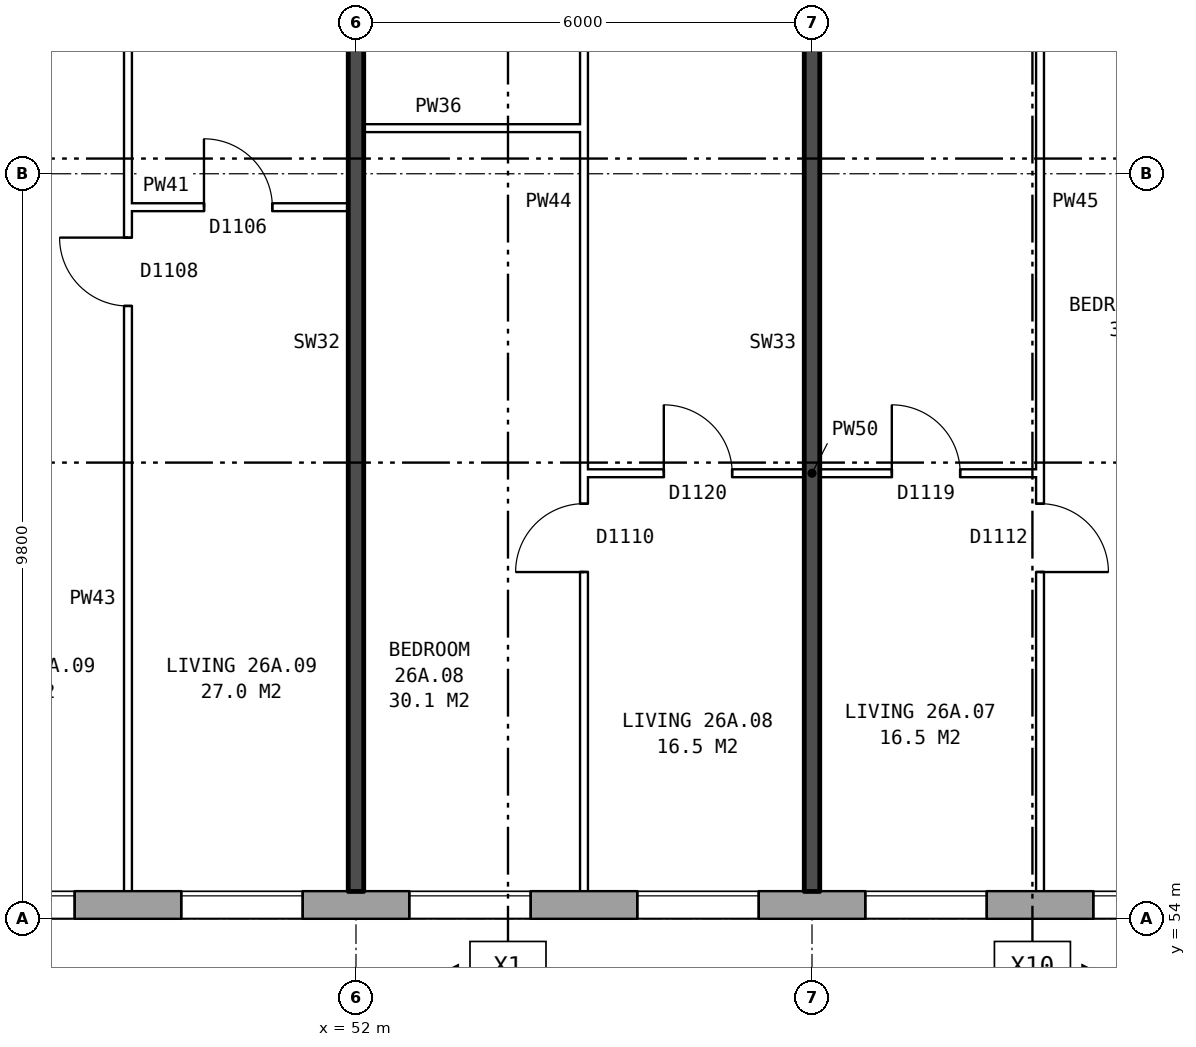
"""IFC4 building model, lengths in metres.
Left out: names, types, materials, properties, quantities, classifications, styles, units other than length and angle.
Written with IfcOpenShell. Run it as: python <this file> out.ifc"""

import sys

from ifc_helpers import new_model, si_unit, direction, frame, frame_2d, origin, place, context, subcontext, project, spatial, rectangle, extrude, element, fill, save


model = new_model("IFC4")
c1 = context("Model", 3, precision=1e-05, world=origin(), true_north=direction((0.0, 1.0)))
c2 = subcontext(c1, "Body", "Model", "MODEL_VIEW")
j1 = project(units=[si_unit("LENGTHUNIT", "METRE"), si_unit("PLANEANGLEUNIT", "RADIAN")], contexts=[c1])
p1 = place(None, origin())
s1 = spatial("IfcSite", under=j1, at=p1, CompositionType="ELEMENT")
p2 = place(p1, origin())
s2 = spatial("IfcBuilding", under=s1, at=p2, CompositionType="ELEMENT")
p3 = place(p2, frame((0.0, 0.0, 96.4)))
s3 = spatial("IfcBuildingStorey", under=s2, at=p3, CompositionType="ELEMENT", Elevation=96.4)
p4 = place(p3, frame((28.075, 54.18, 0.0), z_axis=(0.0, 0.0, 1.0), x_axis=(1.0, 0.0, 0.0)))
e1 = element("IfcWall", 1, at=p4, inside=s3, PredefinedType="STANDARD", context=c2, shape_type="SweptSolid", body=[
    extrude(rectangle(XDim=44.851, YDim=0.36, at=frame_2d((22.425, 0.0))), origin(), (0.0, 0.0, 1.0), 2.85),
])
p5 = place(p4, frame((0.4, 0.0, 0.8)))
e2 = element("IfcOpeningElement", 2, at=p5, cuts=e1, PredefinedType="OPENING", context=c2, shape_type="SweptSolid", body=[
    extrude(rectangle(XDim=0.8, YDim=0.9, at=frame_2d((0.4, 0.45))), frame((0.0, 0.19, 0.0), z_axis=(0.0, -1.0, 0.0), x_axis=(1.0, 0.0, 0.0)), (0.0, 0.0, 1.0), 0.38),
])
p6 = place(p4, frame((3.625, 0.0, 0.8)))
e3 = element("IfcOpeningElement", 3, at=p6, cuts=e1, PredefinedType="OPENING", context=c2, shape_type="SweptSolid", body=[
    extrude(rectangle(XDim=1.6, YDim=1.8, at=frame_2d((0.8, 0.9))), frame((0.0, 0.19, 0.0), z_axis=(0.0, -1.0, 0.0), x_axis=(1.0, 0.0, 0.0)), (0.0, 0.0, 1.0), 0.38),
])
p7 = place(p4, frame((6.625, 0.0, 0.8)))
e4 = element("IfcOpeningElement", 4, at=p7, cuts=e1, PredefinedType="OPENING", context=c2, shape_type="SweptSolid", body=[
    extrude(rectangle(XDim=1.6, YDim=1.8, at=frame_2d((0.8, 0.9))), frame((0.0, 0.19, 0.0), z_axis=(0.0, -1.0, 0.0), x_axis=(1.0, 0.0, 0.0)), (0.0, 0.0, 1.0), 0.38),
])
p8 = place(p4, frame((9.625, 0.0, 0.8)))
e5 = element("IfcOpeningElement", 5, at=p8, cuts=e1, PredefinedType="OPENING", context=c2, shape_type="SweptSolid", body=[
    extrude(rectangle(XDim=1.6, YDim=1.8, at=frame_2d((0.8, 0.9))), frame((0.0, 0.19, 0.0), z_axis=(0.0, -1.0, 0.0), x_axis=(1.0, 0.0, 0.0)), (0.0, 0.0, 1.0), 0.38),
])
p9 = place(p4, frame((12.625, 0.0, 0.8)))
e6 = element("IfcOpeningElement", 6, at=p9, cuts=e1, PredefinedType="OPENING", context=c2, shape_type="SweptSolid", body=[
    extrude(rectangle(XDim=1.6, YDim=1.8, at=frame_2d((0.8, 0.9))), frame((0.0, 0.19, 0.0), z_axis=(0.0, -1.0, 0.0), x_axis=(1.0, 0.0, 0.0)), (0.0, 0.0, 1.0), 0.38),
])
p10 = place(p4, frame((15.625, 0.0, 0.8)))
e7 = element("IfcOpeningElement", 7, at=p10, cuts=e1, PredefinedType="OPENING", context=c2, shape_type="SweptSolid", body=[
    extrude(rectangle(XDim=1.6, YDim=1.8, at=frame_2d((0.8, 0.9))), frame((0.0, 0.19, 0.0), z_axis=(0.0, -1.0, 0.0), x_axis=(1.0, 0.0, 0.0)), (0.0, 0.0, 1.0), 0.38),
])
p11 = place(p4, frame((18.625, 0.0, 0.8)))
e8 = element("IfcOpeningElement", 8, at=p11, cuts=e1, PredefinedType="OPENING", context=c2, shape_type="SweptSolid", body=[
    extrude(rectangle(XDim=1.6, YDim=1.8, at=frame_2d((0.8, 0.9))), frame((0.0, 0.19, 0.0), z_axis=(0.0, -1.0, 0.0), x_axis=(1.0, 0.0, 0.0)), (0.0, 0.0, 1.0), 0.38),
])
p12 = place(p4, frame((21.625, 0.0, 0.8)))
e9 = element("IfcOpeningElement", 9, at=p12, cuts=e1, PredefinedType="OPENING", context=c2, shape_type="SweptSolid", body=[
    extrude(rectangle(XDim=1.6, YDim=1.8, at=frame_2d((0.8, 0.9))), frame((0.0, 0.19, 0.0), z_axis=(0.0, -1.0, 0.0), x_axis=(1.0, 0.0, 0.0)), (0.0, 0.0, 1.0), 0.38),
])
p13 = place(p4, frame((24.625, 0.0, 0.8)))
e10 = element("IfcOpeningElement", 10, at=p13, cuts=e1, PredefinedType="OPENING", context=c2, shape_type="SweptSolid", body=[
    extrude(rectangle(XDim=1.6, YDim=1.8, at=frame_2d((0.8, 0.9))), frame((0.0, 0.19, 0.0), z_axis=(0.0, -1.0, 0.0), x_axis=(1.0, 0.0, 0.0)), (0.0, 0.0, 1.0), 0.38),
])
p14 = place(p4, frame((27.625, 0.0, 0.8)))
e11 = element("IfcOpeningElement", 11, at=p14, cuts=e1, PredefinedType="OPENING", context=c2, shape_type="SweptSolid", body=[
    extrude(rectangle(XDim=1.6, YDim=1.8, at=frame_2d((0.8, 0.9))), frame((0.0, 0.19, 0.0), z_axis=(0.0, -1.0, 0.0), x_axis=(1.0, 0.0, 0.0)), (0.0, 0.0, 1.0), 0.38),
])
p15 = place(p4, frame((30.625, 0.0, 0.8)))
e12 = element("IfcOpeningElement", 12, at=p15, cuts=e1, PredefinedType="OPENING", context=c2, shape_type="SweptSolid", body=[
    extrude(rectangle(XDim=1.6, YDim=1.8, at=frame_2d((0.8, 0.9))), frame((0.0, 0.19, 0.0), z_axis=(0.0, -1.0, 0.0), x_axis=(1.0, 0.0, 0.0)), (0.0, 0.0, 1.0), 0.38),
])
p16 = place(p4, frame((33.625, 0.0, 0.8)))
e13 = element("IfcOpeningElement", 13, at=p16, cuts=e1, PredefinedType="OPENING", context=c2, shape_type="SweptSolid", body=[
    extrude(rectangle(XDim=1.6, YDim=1.8, at=frame_2d((0.8, 0.9))), frame((0.0, 0.19, 0.0), z_axis=(0.0, -1.0, 0.0), x_axis=(1.0, 0.0, 0.0)), (0.0, 0.0, 1.0), 0.38),
])
p17 = place(p4, frame((36.625, 0.0, 0.8)))
e14 = element("IfcOpeningElement", 14, at=p17, cuts=e1, PredefinedType="OPENING", context=c2, shape_type="SweptSolid", body=[
    extrude(rectangle(XDim=1.6, YDim=1.8, at=frame_2d((0.8, 0.9))), frame((0.0, 0.19, 0.0), z_axis=(0.0, -1.0, 0.0), x_axis=(1.0, 0.0, 0.0)), (0.0, 0.0, 1.0), 0.38),
])
p18 = place(p4, frame((39.625, 0.0, 0.8)))
e15 = element("IfcOpeningElement", 15, at=p18, cuts=e1, PredefinedType="OPENING", context=c2, shape_type="SweptSolid", body=[
    extrude(rectangle(XDim=1.6, YDim=1.8, at=frame_2d((0.8, 0.9))), frame((0.0, 0.19, 0.0), z_axis=(0.0, -1.0, 0.0), x_axis=(1.0, 0.0, 0.0)), (0.0, 0.0, 1.0), 0.38),
])
p19 = place(p4, frame((42.125, 0.0, 0.8)))
e16 = element("IfcOpeningElement", 16, at=p19, cuts=e1, PredefinedType="OPENING", context=c2, shape_type="SweptSolid", body=[
    extrude(rectangle(XDim=1.0, YDim=1.8, at=frame_2d((0.5, 0.9))), frame((0.0, 0.19, 0.0), z_axis=(0.0, -1.0, 0.0), x_axis=(1.0, 0.0, 0.0)), (0.0, 0.0, 1.0), 0.38),
])
p20 = place(p4, frame((1.65, 0.0, 0.8)))
e17 = element("IfcOpeningElement", 17, at=p20, cuts=e1, PredefinedType="OPENING", context=c2, shape_type="SweptSolid", body=[
    extrude(rectangle(XDim=1.6, YDim=1.8, at=frame_2d((0.8, 0.9))), frame((0.0, 0.19, 0.0), z_axis=(0.0, -1.0, 0.0), x_axis=(1.0, 0.0, 0.0)), (0.0, 0.0, 1.0), 0.38),
])
p21 = place(p4, frame((43.425, 0.0, 0.8)))
e18 = element("IfcOpeningElement", 18, at=p21, cuts=e1, PredefinedType="OPENING", context=c2, shape_type="SweptSolid", body=[
    extrude(rectangle(XDim=1.0, YDim=0.9, at=frame_2d((0.5, 0.45))), frame((0.0, 0.19, 0.0), z_axis=(0.0, -1.0, 0.0), x_axis=(1.0, 0.0, 0.0)), (0.0, 0.0, 1.0), 0.38),
])
p22 = place(p3, frame((55.0, 59.86, 0.0), z_axis=(0.0, 0.0, 1.0), x_axis=(1.0, 0.0, 0.0)))
e19 = element("IfcWall", 19, at=p22, inside=s3, PredefinedType="PARTITIONING", context=c2, shape_type="SweptSolid", body=[
    extrude(rectangle(XDim=6.0, YDim=0.1, at=frame_2d((3.0, 0.0))), origin(), (0.0, 0.0, 1.0), 2.85),
])
p23 = place(p22, frame((4.05, 0.0, 0.0)))
e20 = element("IfcOpeningElement", 20, at=p23, cuts=e19, PredefinedType="OPENING", context=c2, shape_type="SweptSolid", body=[
    extrude(rectangle(XDim=0.9, YDim=2.1, at=frame_2d((0.45, 1.05))), frame((0.0, 0.06, 0.0), z_axis=(0.0, -1.0, 0.0), x_axis=(1.0, 0.0, 0.0)), (0.0, 0.0, 1.0), 0.12),
])
p24 = place(p22, frame((1.05, 0.0, 0.0)))
e21 = element("IfcOpeningElement", 21, at=p24, cuts=e19, PredefinedType="OPENING", context=c2, shape_type="SweptSolid", body=[
    extrude(rectangle(XDim=0.9, YDim=2.1, at=frame_2d((0.45, 1.05))), frame((0.0, 0.06, 0.0), z_axis=(0.0, -1.0, 0.0), x_axis=(1.0, 0.0, 0.0)), (0.0, 0.0, 1.0), 0.12),
])
p25 = place(p3, frame((49.0, 63.36, 0.0), z_axis=(0.0, 0.0, 1.0), x_axis=(1.0, 0.0, 0.0)))
e22 = element("IfcWall", 22, at=p25, inside=s3, PredefinedType="PARTITIONING", context=c2, shape_type="SweptSolid", body=[
    extrude(rectangle(XDim=2.9, YDim=0.1, at=frame_2d((1.45, 0.0))), origin(), (0.0, 0.0, 1.0), 2.85),
])
p26 = place(p25, frame((1.0, 0.0, 0.0)))
e23 = element("IfcOpeningElement", 23, at=p26, cuts=e22, PredefinedType="OPENING", context=c2, shape_type="SweptSolid", body=[
    extrude(rectangle(XDim=0.9, YDim=2.1, at=frame_2d((0.45, 1.05))), frame((0.0, 0.06, 0.0), z_axis=(0.0, -1.0, 0.0), x_axis=(1.0, 0.0, 0.0)), (0.0, 0.0, 1.0), 0.12),
])
p27 = place(p3, frame((52.1, 64.4, 0.0), z_axis=(0.0, 0.0, 1.0), x_axis=(1.0, 0.0, 0.0)))
e24 = element("IfcWall", 24, at=p27, inside=s3, PredefinedType="PARTITIONING", context=c2, shape_type="SweptSolid", body=[
    extrude(rectangle(XDim=2.9, YDim=0.1, at=frame_2d((1.45, 0.0))), origin(), (0.0, 0.0, 1.0), 2.85),
])
p28 = place(p3, frame((49.0, 54.36, 0.0), z_axis=(0.0, 0.0, 1.0), x_axis=(0.0, 1.0, 0.0)))
e25 = element("IfcWall", 25, at=p28, inside=s3, PredefinedType="PARTITIONING", context=c2, shape_type="SweptSolid", body=[
    extrude(rectangle(XDim=14.34, YDim=0.1, at=frame_2d((7.17, 0.0))), origin(), (0.0, 0.0, 1.0), 2.85),
])
p29 = place(p28, frame((7.7, 0.0, 0.0)))
e26 = element("IfcOpeningElement", 26, at=p29, cuts=e25, PredefinedType="OPENING", context=c2, shape_type="SweptSolid", body=[
    extrude(rectangle(XDim=0.9, YDim=2.1, at=frame_2d((0.45, 1.05))), frame((0.0, 0.06, 0.0), z_axis=(0.0, -1.0, 0.0), x_axis=(1.0, 0.0, 0.0)), (0.0, 0.0, 1.0), 0.12),
])
p30 = place(p28, frame((13.04, 0.0, 0.0)))
e27 = element("IfcOpeningElement", 27, at=p30, cuts=e25, PredefinedType="OPENING", context=c2, shape_type="SweptSolid", body=[
    extrude(rectangle(XDim=0.9, YDim=2.1, at=frame_2d((0.45, 1.05))), frame((0.0, 0.06, 0.0), z_axis=(0.0, -1.0, 0.0), x_axis=(1.0, 0.0, 0.0)), (0.0, 0.0, 1.0), 0.12),
])
p31 = place(p3, frame((52.0, 54.36, 0.0), z_axis=(0.0, 0.0, 1.0), x_axis=(0.0, 1.0, 0.0)))
e28 = element("IfcWall", 28, at=p31, inside=s3, PredefinedType="SOLIDWALL", context=c2, shape_type="SweptSolid", body=[
    extrude(rectangle(XDim=14.44, YDim=0.2, at=frame_2d((7.22, 0.0))), origin(), (0.0, 0.0, 1.0), 2.85),
])
p32 = place(p3, frame((55.0, 54.36, 0.0), z_axis=(0.0, 0.0, 1.0), x_axis=(0.0, 1.0, 0.0)))
e29 = element("IfcWall", 29, at=p32, inside=s3, PredefinedType="PARTITIONING", context=c2, shape_type="SweptSolid", body=[
    extrude(rectangle(XDim=14.34, YDim=0.1, at=frame_2d((7.17, 0.0))), origin(), (0.0, 0.0, 1.0), 2.85),
])
p33 = place(p32, frame((4.2, 0.0, 0.0)))
e30 = element("IfcOpeningElement", 30, at=p33, cuts=e29, PredefinedType="OPENING", context=c2, shape_type="SweptSolid", body=[
    extrude(rectangle(XDim=0.9, YDim=2.1, at=frame_2d((0.45, 1.05))), frame((0.0, 0.06, 0.0), z_axis=(0.0, -1.0, 0.0), x_axis=(1.0, 0.0, 0.0)), (0.0, 0.0, 1.0), 0.12),
])
p34 = place(p32, frame((13.04, 0.0, 0.0)))
e31 = element("IfcOpeningElement", 31, at=p34, cuts=e29, PredefinedType="OPENING", context=c2, shape_type="SweptSolid", body=[
    extrude(rectangle(XDim=0.9, YDim=2.1, at=frame_2d((0.45, 1.05))), frame((0.0, 0.06, 0.0), z_axis=(0.0, -1.0, 0.0), x_axis=(1.0, 0.0, 0.0)), (0.0, 0.0, 1.0), 0.12),
])
p35 = place(p3, frame((58.0, 54.36, 0.0), z_axis=(0.0, 0.0, 1.0), x_axis=(0.0, 1.0, 0.0)))
e32 = element("IfcWall", 32, at=p35, inside=s3, PredefinedType="SOLIDWALL", context=c2, shape_type="SweptSolid", body=[
    extrude(rectangle(XDim=14.44, YDim=0.2, at=frame_2d((7.22, 0.0))), origin(), (0.0, 0.0, 1.0), 2.85),
])
p36 = place(p3, frame((61.0, 54.36, 0.0), z_axis=(0.0, 0.0, 1.0), x_axis=(0.0, 1.0, 0.0)))
e33 = element("IfcWall", 33, at=p36, inside=s3, PredefinedType="PARTITIONING", context=c2, shape_type="SweptSolid", body=[
    extrude(rectangle(XDim=14.34, YDim=0.1, at=frame_2d((7.17, 0.0))), origin(), (0.0, 0.0, 1.0), 2.85),
])
p37 = place(p36, frame((4.2, 0.0, 0.0)))
e34 = element("IfcOpeningElement", 34, at=p37, cuts=e33, PredefinedType="OPENING", context=c2, shape_type="SweptSolid", body=[
    extrude(rectangle(XDim=0.9, YDim=2.1, at=frame_2d((0.45, 1.05))), frame((0.0, 0.06, 0.0), z_axis=(0.0, -1.0, 0.0), x_axis=(1.0, 0.0, 0.0)), (0.0, 0.0, 1.0), 0.12),
])
p38 = place(p36, frame((13.04, 0.0, 0.0)))
e35 = element("IfcOpeningElement", 35, at=p38, cuts=e33, PredefinedType="OPENING", context=c2, shape_type="SweptSolid", body=[
    extrude(rectangle(XDim=0.9, YDim=2.1, at=frame_2d((0.45, 1.05))), frame((0.0, 0.06, 0.0), z_axis=(0.0, -1.0, 0.0), x_axis=(1.0, 0.0, 0.0)), (0.0, 0.0, 1.0), 0.12),
])
p39 = place(p11, origin())
e36 = element("IfcWindow", 36, at=p39, inside=s3, PartitioningType="SINGLE_PANEL", PredefinedType="WINDOW", context=c2, shape_type="SweptSolid", body=[
    extrude(rectangle(XDim=1.6, YDim=1.8, at=frame_2d((0.8, 0.9))), frame((0.0, 0.15, 0.0), z_axis=(0.0, -1.0, 0.0), x_axis=(1.0, 0.0, 0.0)), (0.0, 0.0, 1.0), 0.06),
])
fill(e8, e36)
p40 = place(p12, origin())
e37 = element("IfcWindow", 37, at=p40, inside=s3, PartitioningType="SINGLE_PANEL", PredefinedType="WINDOW", context=c2, shape_type="SweptSolid", body=[
    extrude(rectangle(XDim=1.6, YDim=1.8, at=frame_2d((0.8, 0.9))), frame((0.0, 0.15, 0.0), z_axis=(0.0, -1.0, 0.0), x_axis=(1.0, 0.0, 0.0)), (0.0, 0.0, 1.0), 0.06),
])
fill(e9, e37)
p41 = place(p13, origin())
e38 = element("IfcWindow", 38, at=p41, inside=s3, PartitioningType="SINGLE_PANEL", PredefinedType="WINDOW", context=c2, shape_type="SweptSolid", body=[
    extrude(rectangle(XDim=1.6, YDim=1.8, at=frame_2d((0.8, 0.9))), frame((0.0, 0.15, 0.0), z_axis=(0.0, -1.0, 0.0), x_axis=(1.0, 0.0, 0.0)), (0.0, 0.0, 1.0), 0.06),
])
fill(e10, e38)
p42 = place(p14, origin())
e39 = element("IfcWindow", 39, at=p42, inside=s3, PartitioningType="SINGLE_PANEL", PredefinedType="WINDOW", context=c2, shape_type="SweptSolid", body=[
    extrude(rectangle(XDim=1.6, YDim=1.8, at=frame_2d((0.8, 0.9))), frame((0.0, 0.15, 0.0), z_axis=(0.0, -1.0, 0.0), x_axis=(1.0, 0.0, 0.0)), (0.0, 0.0, 1.0), 0.06),
])
fill(e11, e39)
p43 = place(p15, origin())
e40 = element("IfcWindow", 40, at=p43, inside=s3, PartitioningType="SINGLE_PANEL", PredefinedType="WINDOW", context=c2, shape_type="SweptSolid", body=[
    extrude(rectangle(XDim=1.6, YDim=1.8, at=frame_2d((0.8, 0.9))), frame((0.0, 0.15, 0.0), z_axis=(0.0, -1.0, 0.0), x_axis=(1.0, 0.0, 0.0)), (0.0, 0.0, 1.0), 0.06),
])
fill(e12, e40)
p44 = place(p16, origin())
e41 = element("IfcWindow", 41, at=p44, inside=s3, PartitioningType="SINGLE_PANEL", PredefinedType="WINDOW", context=c2, shape_type="SweptSolid", body=[
    extrude(rectangle(XDim=1.6, YDim=1.8, at=frame_2d((0.8, 0.9))), frame((0.0, 0.15, 0.0), z_axis=(0.0, -1.0, 0.0), x_axis=(1.0, 0.0, 0.0)), (0.0, 0.0, 1.0), 0.06),
])
fill(e13, e41)
p45 = place(p37, frame((0.9, 0.0, 0.0), z_axis=(0.0, 0.0, 1.0), x_axis=(-1.0, 0.0, 0.0)))
e42 = element("IfcDoor", 42, at=p45, inside=s3, OperationType="SINGLE_SWING_RIGHT", PredefinedType="DOOR", context=c2, shape_type="SweptSolid", body=[
    extrude(rectangle(XDim=0.9, YDim=2.1, at=frame_2d((0.45, 1.05))), frame((0.0, 0.025, 0.0), z_axis=(0.0, -1.0, 0.0), x_axis=(1.0, 0.0, 0.0)), (0.0, 0.0, 1.0), 0.05),
])
fill(e34, e42)
p46 = place(p23, origin())
e43 = element("IfcDoor", 43, at=p46, inside=s3, OperationType="SINGLE_SWING_LEFT", PredefinedType="DOOR", context=c2, shape_type="SweptSolid", body=[
    extrude(rectangle(XDim=0.9, YDim=2.1, at=frame_2d((0.45, 1.05))), frame((0.0, 0.025, 0.0), z_axis=(0.0, -1.0, 0.0), x_axis=(1.0, 0.0, 0.0)), (0.0, 0.0, 1.0), 0.05),
])
fill(e20, e43)
p47 = place(p33, origin())
e44 = element("IfcDoor", 44, at=p47, inside=s3, OperationType="SINGLE_SWING_LEFT", PredefinedType="DOOR", context=c2, shape_type="SweptSolid", body=[
    extrude(rectangle(XDim=0.9, YDim=2.1, at=frame_2d((0.45, 1.05))), frame((0.0, 0.025, 0.0), z_axis=(0.0, -1.0, 0.0), x_axis=(1.0, 0.0, 0.0)), (0.0, 0.0, 1.0), 0.05),
])
fill(e30, e44)
p48 = place(p24, origin())
e45 = element("IfcDoor", 45, at=p48, inside=s3, OperationType="SINGLE_SWING_LEFT", PredefinedType="DOOR", context=c2, shape_type="SweptSolid", body=[
    extrude(rectangle(XDim=0.9, YDim=2.1, at=frame_2d((0.45, 1.05))), frame((0.0, 0.025, 0.0), z_axis=(0.0, -1.0, 0.0), x_axis=(1.0, 0.0, 0.0)), (0.0, 0.0, 1.0), 0.05),
])
fill(e21, e45)
p49 = place(p29, origin())
e46 = element("IfcDoor", 46, at=p49, inside=s3, OperationType="SINGLE_SWING_RIGHT", PredefinedType="DOOR", context=c2, shape_type="SweptSolid", body=[
    extrude(rectangle(XDim=0.9, YDim=2.1, at=frame_2d((0.45, 1.05))), frame((0.0, 0.025, 0.0), z_axis=(0.0, -1.0, 0.0), x_axis=(1.0, 0.0, 0.0)), (0.0, 0.0, 1.0), 0.05),
])
fill(e26, e46)
p50 = place(p26, origin())
e47 = element("IfcDoor", 47, at=p50, inside=s3, OperationType="SINGLE_SWING_LEFT", PredefinedType="DOOR", context=c2, shape_type="SweptSolid", body=[
    extrude(rectangle(XDim=0.9, YDim=2.1, at=frame_2d((0.45, 1.05))), frame((0.0, 0.025, 0.0), z_axis=(0.0, -1.0, 0.0), x_axis=(1.0, 0.0, 0.0)), (0.0, 0.0, 1.0), 0.05),
])
fill(e23, e47)
save(model, sys.argv[1])
